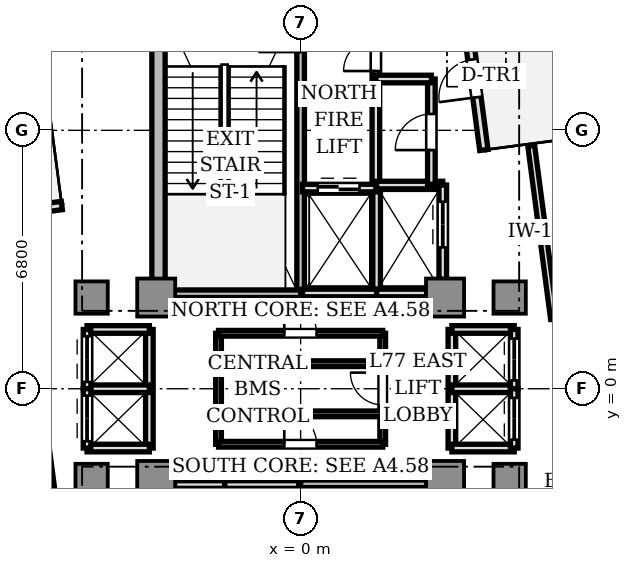
"""IFC4 building model, lengths in metres.
Left out: names, types, materials, properties, quantities, classifications, styles, units other than length and angle.
Written with IfcOpenShell. Run it as: python <this file> out.ifc"""

import sys

from ifc_helpers import new_model, si_unit, direction, frame, frame_2d, origin, origin_2d, place, context, subcontext, project, spatial, rectangle, extrude, source, transform, mapped, element, fill, save


model = new_model("IFC4")
c1 = context("Model", 3, precision=1e-05, world=origin(), true_north=direction((0.0, 1.0)))
c2 = subcontext(c1, "Body", "Model", "MODEL_VIEW")
j1 = project(units=[si_unit("LENGTHUNIT", "METRE"), si_unit("PLANEANGLEUNIT", "RADIAN")], contexts=[c1])
p1 = place(None, origin())
s1 = spatial("IfcSite", under=j1, at=p1, CompositionType="ELEMENT")
p2 = place(p1, origin())
s2 = spatial("IfcBuilding", under=s1, at=p2, CompositionType="ELEMENT")
p3 = place(p2, frame((0.0, 0.0, 275.8)))
s3 = spatial("IfcBuildingStorey", under=s2, at=p3, CompositionType="ELEMENT", Elevation=275.8)
p4 = place(p3, frame((-3.74, 2.85, 0.0), z_axis=(0.0, 0.0, 1.0), x_axis=(0.0, 1.0, 0.0)))
e1 = element("IfcWall", 1, at=p4, inside=s3, PredefinedType="SHEAR", context=c2, shape_type="SweptSolid", body=[
    extrude(rectangle(XDim=6.9, YDim=0.35, at=frame_2d((3.45, 0.0))), origin(), (0.0, 0.0, 1.0), 4.1),
])
m1 = source(origin(), c2, "Body", "SweptSolid", [
    extrude(rectangle(XDim=1.0, YDim=1.0, at=origin_2d()), origin(), (0.0, 0.0, 1.0), 4.1),
])
for number, where, z_axis, x_axis in (
    (2, (-3.8, 2.4, 0.0), (0.0, 0.0, 1.0), (1.0, 0.0, 0.0)),
    (3, (3.8, 2.4, 0.0), (0.0, 0.0, 1.0), (1.0, 0.0, 0.0)),
    (4, (-3.8, -2.4, 0.0), (0.0, 0.0, 1.0), (1.0, 0.0, 0.0)),
    (5, (3.8, -2.4, 0.0), (0.0, 0.0, 1.0), (1.0, 0.0, 0.0)),
):
    element("IfcColumn", number, at=place(p3, frame(where, z_axis=z_axis, x_axis=x_axis)), inside=s3, PredefinedType="COLUMN", context=c2, shape_type="MappedRepresentation", body=[
        mapped(m1, transform((0.0, 0.0, 0.0), scale=1.0)),
    ])
m2 = source(origin(), c2, "Body", "SweptSolid", [
    extrude(rectangle(XDim=0.85, YDim=0.85, at=origin_2d()), origin(), (0.0, 0.0, 1.0), 4.1),
])
for number, where, z_axis, x_axis in (
    (6, (5.5, 2.4, 0.0), (0.0, 0.0, 1.0), (1.0, 0.0, 0.0)),
    (7, (-5.5, 2.4, 0.0), (0.0, 0.0, 1.0), (1.0, 0.0, 0.0)),
    (8, (5.5, -2.4, 0.0), (0.0, 0.0, 1.0), (1.0, 0.0, 0.0)),
    (9, (-5.5, -2.4, 0.0), (0.0, 0.0, 1.0), (1.0, 0.0, 0.0)),
):
    element("IfcColumn", number, at=place(p3, frame(where, z_axis=z_axis, x_axis=x_axis)), inside=s3, PredefinedType="COLUMN", context=c2, shape_type="MappedRepresentation", body=[
        mapped(m2, transform((0.0, 0.0, 0.0), scale=1.0)),
    ])
p5 = place(p3, frame((4.821, 6.283, 0.0), z_axis=(0.0, 0.0, 1.0), x_axis=(-0.130475563272, 0.991451525486, 0.0)))
e10 = element("IfcWall", 10, at=p5, inside=s3, PredefinedType="STANDARD", context=c2, shape_type="SweptSolid", body=[
    extrude(rectangle(XDim=2.7, YDim=0.22, at=frame_2d((1.35, 0.0))), origin(), (0.0, 0.0, 1.0), 4.1),
])
p6 = place(p5, frame((1.4, 0.0, 0.0)))
e11 = element("IfcOpeningElement", 11, at=p6, cuts=e10, PredefinedType="OPENING", context=c2, shape_type="SweptSolid", body=[
    extrude(rectangle(XDim=1.0, YDim=2.2, at=frame_2d((0.5, 1.1))), frame((0.0, 0.12, 0.0), z_axis=(0.0, -1.0, 0.0), x_axis=(1.0, 0.0, 0.0)), (0.0, 0.0, 1.0), 0.24),
])
p7 = place(p3, frame((-6.283, 4.821, 0.0), z_axis=(0.0, 0.0, 1.0), x_axis=(-0.991451525486, -0.130475563272, 0.0)))
e12 = element("IfcWall", 12, at=p7, inside=s3, PredefinedType="STANDARD", context=c2, shape_type="SweptSolid", body=[
    extrude(rectangle(XDim=2.7, YDim=0.22, at=frame_2d((1.35, 0.0))), origin(), (0.0, 0.0, 1.0), 4.1),
])
p8 = place(p7, frame((1.4, 0.0, 0.0)))
e13 = element("IfcOpeningElement", 13, at=p8, cuts=e12, PredefinedType="OPENING", context=c2, shape_type="SweptSolid", body=[
    extrude(rectangle(XDim=1.0, YDim=2.2, at=frame_2d((0.5, 1.1))), frame((0.0, 0.12, 0.0), z_axis=(0.0, -1.0, 0.0), x_axis=(1.0, 0.0, 0.0)), (0.0, 0.0, 1.0), 0.24),
])
p9 = place(p3, frame((0.0, 2.5, 0.0), z_axis=(0.0, 0.0, 1.0), x_axis=(0.0, 1.0, 0.0)))
e14 = element("IfcWall", 14, at=p9, inside=s3, PredefinedType="SOLIDWALL", context=c2, shape_type="SweptSolid", body=[
    extrude(rectangle(XDim=7.68, YDim=0.2, at=frame_2d((3.84, 0.0))), origin(), (0.0, 0.0, 1.0), 4.1),
])
p10 = place(p9, frame((6.36, 0.0, 0.0)))
e15 = element("IfcOpeningElement", 15, at=p10, cuts=e14, PredefinedType="OPENING", context=c2, shape_type="SweptSolid", body=[
    extrude(rectangle(XDim=1.1, YDim=2.15, at=frame_2d((0.55, 1.075))), frame((0.0, 0.11, 0.0), z_axis=(0.0, -1.0, 0.0), x_axis=(1.0, 0.0, 0.0)), (0.0, 0.0, 1.0), 0.22),
])
p11 = place(p3, frame((-3.72, 2.5, 0.0), z_axis=(0.0, 0.0, 1.0), x_axis=(1.0, 0.0, 0.0)))
e16 = element("IfcWall", 16, at=p11, inside=s3, PredefinedType="SOLIDWALL", context=c2, shape_type="SweptSolid", body=[
    extrude(rectangle(XDim=3.72, YDim=0.2, at=frame_2d((1.86, 0.0))), origin(), (0.0, 0.0, 1.0), 4.1),
])
p12 = place(p3, frame((0.0, -10.18, 0.0), z_axis=(0.0, 0.0, 1.0), x_axis=(0.0, 1.0, 0.0)))
e17 = element("IfcWall", 17, at=p12, inside=s3, PredefinedType="SOLIDWALL", context=c2, shape_type="SweptSolid", body=[
    extrude(rectangle(XDim=7.68, YDim=0.2, at=frame_2d((3.84, 0.0))), origin(), (0.0, 0.0, 1.0), 4.1),
])
p13 = place(p12, frame((0.28, 0.0, 0.0)))
e18 = element("IfcOpeningElement", 18, at=p13, cuts=e17, PredefinedType="OPENING", context=c2, shape_type="SweptSolid", body=[
    extrude(rectangle(XDim=1.1, YDim=2.15, at=frame_2d((0.55, 1.075))), frame((0.0, 0.11, 0.0), z_axis=(0.0, -1.0, 0.0), x_axis=(1.0, 0.0, 0.0)), (0.0, 0.0, 1.0), 0.22),
])
p14 = place(p3, frame((0.0, -2.5, 0.0), z_axis=(0.0, 0.0, 1.0), x_axis=(1.0, 0.0, 0.0)))
e19 = element("IfcWall", 19, at=p14, inside=s3, PredefinedType="SOLIDWALL", context=c2, shape_type="SweptSolid", body=[
    extrude(rectangle(XDim=3.72, YDim=0.2, at=frame_2d((1.86, 0.0))), origin(), (0.0, 0.0, 1.0), 4.1),
])
p15 = place(p3, frame((1.98, 5.32, 0.0), z_axis=(0.0, 0.0, 1.0), x_axis=(0.0, 1.0, 0.0)))
e20 = element("IfcWall", 20, at=p15, inside=s3, PredefinedType="SOLIDWALL", context=c2, shape_type="SweptSolid", body=[
    extrude(rectangle(XDim=4.66, YDim=0.2, at=frame_2d((2.33, 0.0))), origin(), (0.0, 0.0, 1.0), 3.65),
])
p16 = place(p15, frame((3.04, 0.0, 0.0)))
e21 = element("IfcOpeningElement", 21, at=p16, cuts=e20, PredefinedType="OPENING", context=c2, shape_type="SweptSolid", body=[
    extrude(rectangle(XDim=0.85, YDim=2.1, at=frame_2d((0.425, 1.05))), frame((0.0, 0.11, 0.0), z_axis=(0.0, -1.0, 0.0), x_axis=(1.0, 0.0, 0.0)), (0.0, 0.0, 1.0), 0.22),
])
p17 = place(p3, frame((2.0, 2.5, 0.0), z_axis=(0.0, 0.0, 1.0), x_axis=(0.0, 1.0, 0.0)))
e22 = element("IfcWall", 22, at=p17, inside=s3, PredefinedType="SOLIDWALL", context=c2, shape_type="SweptSolid", body=[
    extrude(rectangle(XDim=2.78, YDim=0.2, at=frame_2d((1.39, 0.0))), origin(), (0.0, 0.0, 1.0), 3.65),
])
p18 = place(p3, frame((0.05, 2.52, 0.0), z_axis=(0.0, 0.0, 1.0), x_axis=(1.0, 0.0, 0.0)))
e23 = element("IfcWall", 23, at=p18, inside=s3, PredefinedType="SOLIDWALL", context=c2, shape_type="SweptSolid", body=[
    extrude(rectangle(XDim=1.95, YDim=0.2, at=frame_2d((0.975, 0.0))), origin(), (0.0, 0.0, 1.0), 3.65),
])
p19 = place(p3, frame((0.05, 5.28, 0.0), z_axis=(0.0, 0.0, 1.0), x_axis=(1.0, 0.0, 0.0)))
e24 = element("IfcWall", 24, at=p19, inside=s3, PredefinedType="SOLIDWALL", context=c2, shape_type="SweptSolid", body=[
    extrude(rectangle(XDim=1.93, YDim=0.2, at=frame_2d((0.965, 0.0))), origin(), (0.0, 0.0, 1.0), 3.65),
])
p20 = place(p19, frame((0.4, 0.0, 0.0)))
e25 = element("IfcOpeningElement", 25, at=p20, cuts=e24, PredefinedType="OPENING", context=c2, shape_type="SweptSolid", body=[
    extrude(rectangle(XDim=1.1, YDim=2.2, at=frame_2d((0.55, 1.1))), frame((0.0, 0.11, 0.0), z_axis=(0.0, -1.0, 0.0), x_axis=(1.0, 0.0, 0.0)), (0.0, 0.0, 1.0), 0.22),
])
p21 = place(p3, frame((-2.0, -5.28, 0.0), z_axis=(0.0, 0.0, 1.0), x_axis=(0.0, 1.0, 0.0)))
e26 = element("IfcWall", 26, at=p21, inside=s3, PredefinedType="SOLIDWALL", context=c2, shape_type="SweptSolid", body=[
    extrude(rectangle(XDim=2.78, YDim=0.2, at=frame_2d((1.39, 0.0))), origin(), (0.0, 0.0, 1.0), 3.65),
])
p22 = place(p3, frame((-2.0, -2.52, 0.0), z_axis=(0.0, 0.0, 1.0), x_axis=(1.0, 0.0, 0.0)))
e27 = element("IfcWall", 27, at=p22, inside=s3, PredefinedType="SOLIDWALL", context=c2, shape_type="SweptSolid", body=[
    extrude(rectangle(XDim=1.95, YDim=0.2, at=frame_2d((0.975, 0.0))), origin(), (0.0, 0.0, 1.0), 3.65),
])
p23 = place(p3, frame((2.0, 2.52, 0.0), z_axis=(0.0, 0.0, 1.0), x_axis=(1.0, 0.0, 0.0)))
e28 = element("IfcWall", 28, at=p23, inside=s3, PredefinedType="SOLIDWALL", context=c2, shape_type="SweptSolid", body=[
    extrude(rectangle(XDim=1.32, YDim=0.2, at=frame_2d((0.66, 0.0))), origin(), (0.0, 0.0, 1.0), 3.65),
])
p24 = place(p3, frame((2.0, 5.36, 0.0), z_axis=(0.0, 0.0, 1.0), x_axis=(1.0, 0.0, 0.0)))
e29 = element("IfcWall", 29, at=p24, inside=s3, PredefinedType="SOLIDWALL", context=c2, shape_type="SweptSolid", body=[
    extrude(rectangle(XDim=1.74, YDim=0.2, at=frame_2d((0.87, 0.0))), origin(), (0.0, 0.0, 1.0), 3.65),
])
p25 = place(p3, frame((3.74, 2.88, 0.0), z_axis=(0.0, 0.0, 1.0), x_axis=(0.0, 1.0, 0.0)))
e30 = element("IfcWall", 30, at=p25, inside=s3, PredefinedType="SOLIDWALL", context=c2, shape_type="SweptSolid", body=[
    extrude(rectangle(XDim=2.48, YDim=0.2, at=frame_2d((1.24, 0.0))), origin(), (0.0, 0.0, 1.0), 3.65),
])
p26 = place(p25, frame((0.84, 0.0, 0.0)))
e31 = element("IfcOpeningElement", 31, at=p26, cuts=e30, PredefinedType="OPENING", context=c2, shape_type="SweptSolid", body=[
    extrude(rectangle(XDim=1.2, YDim=2.2, at=frame_2d((0.6, 1.1))), frame((0.0, 0.11, 0.0), z_axis=(0.0, -1.0, 0.0), x_axis=(1.0, 0.0, 0.0)), (0.0, 0.0, 1.0), 0.22),
])
p27 = place(p3, frame((-3.32, -2.52, 0.0), z_axis=(0.0, 0.0, 1.0), x_axis=(1.0, 0.0, 0.0)))
e32 = element("IfcWall", 32, at=p27, inside=s3, PredefinedType="SOLIDWALL", context=c2, shape_type="SweptSolid", body=[
    extrude(rectangle(XDim=1.32, YDim=0.2, at=frame_2d((0.66, 0.0))), origin(), (0.0, 0.0, 1.0), 3.65),
])
p28 = place(p3, frame((3.98, -1.56, 0.0), z_axis=(0.0, 0.0, 1.0), x_axis=(0.0, 1.0, 0.0)))
e33 = element("IfcWall", 33, at=p28, inside=s3, PredefinedType="SOLIDWALL", context=c2, shape_type="SweptSolid", body=[
    extrude(rectangle(XDim=3.12, YDim=0.2, at=frame_2d((1.56, 0.0))), origin(), (0.0, 0.0, 1.0), 3.32),
])
for number, where, z_axis, x_axis in (
    (34, (3.98, 1.56, 0.0), (0.0, 0.0, 1.0), (1.0, 0.0, 0.0)),
    (35, (3.98, -1.56, 0.0), (0.0, 0.0, 1.0), (1.0, 0.0, 0.0)),
    (36, (3.98, 0.0, 0.0), (0.0, 0.0, 1.0), (1.0, 0.0, 0.0)),
):
    element("IfcWall", number, at=place(p3, frame(where, z_axis=z_axis, x_axis=x_axis)), inside=s3, PredefinedType="SOLIDWALL", context=c2, shape_type="SweptSolid", body=[
        extrude(rectangle(XDim=1.64, YDim=0.2, at=frame_2d((0.82, 0.0))), origin(), (0.0, 0.0, 1.0), 3.65),
    ])
p29 = place(p3, frame((5.62, 0.0, 0.0), z_axis=(0.0, 0.0, 1.0), x_axis=(0.0, 1.0, 0.0)))
e37 = element("IfcWall", 37, at=p29, inside=s3, PredefinedType="SOLIDWALL", context=c2, shape_type="SweptSolid", body=[
    extrude(rectangle(XDim=1.56, YDim=0.2, at=frame_2d((0.78, 0.0))), origin(), (0.0, 0.0, 1.0), 3.65),
])
p30 = place(p29, frame((0.22, 0.0, 0.0)))
e38 = element("IfcOpeningElement", 38, at=p30, cuts=e37, PredefinedType="OPENING", context=c2, shape_type="SweptSolid", body=[
    extrude(rectangle(XDim=1.1, YDim=2.2, at=frame_2d((0.55, 1.1))), frame((0.0, 0.11, 0.0), z_axis=(0.0, -1.0, 0.0), x_axis=(1.0, 0.0, 0.0)), (0.0, 0.0, 1.0), 0.22),
])
p31 = place(p3, frame((5.62, -1.56, 0.0), z_axis=(0.0, 0.0, 1.0), x_axis=(0.0, 1.0, 0.0)))
e39 = element("IfcWall", 39, at=p31, inside=s3, PredefinedType="SOLIDWALL", context=c2, shape_type="SweptSolid", body=[
    extrude(rectangle(XDim=1.56, YDim=0.2, at=frame_2d((0.78, 0.0))), origin(), (0.0, 0.0, 1.0), 3.65),
])
p32 = place(p31, frame((0.22, 0.0, 0.0)))
e40 = element("IfcOpeningElement", 40, at=p32, cuts=e39, PredefinedType="OPENING", context=c2, shape_type="SweptSolid", body=[
    extrude(rectangle(XDim=1.1, YDim=2.2, at=frame_2d((0.55, 1.1))), frame((0.0, 0.11, 0.0), z_axis=(0.0, -1.0, 0.0), x_axis=(1.0, 0.0, 0.0)), (0.0, 0.0, 1.0), 0.22),
])
p33 = place(p3, frame((-3.98, -1.56, 0.0), z_axis=(0.0, 0.0, 1.0), x_axis=(0.0, 1.0, 0.0)))
e41 = element("IfcWall", 41, at=p33, inside=s3, PredefinedType="SOLIDWALL", context=c2, shape_type="SweptSolid", body=[
    extrude(rectangle(XDim=3.12, YDim=0.2, at=frame_2d((1.56, 0.0))), origin(), (0.0, 0.0, 1.0), 3.32),
])
for number, where, z_axis, x_axis in (
    (42, (-5.62, 1.56, 0.0), (0.0, 0.0, 1.0), (1.0, 0.0, 0.0)),
    (43, (-5.62, -1.56, 0.0), (0.0, 0.0, 1.0), (1.0, 0.0, 0.0)),
    (44, (-5.62, 0.0, 0.0), (0.0, 0.0, 1.0), (1.0, 0.0, 0.0)),
):
    element("IfcWall", number, at=place(p3, frame(where, z_axis=z_axis, x_axis=x_axis)), inside=s3, PredefinedType="SOLIDWALL", context=c2, shape_type="SweptSolid", body=[
        extrude(rectangle(XDim=1.64, YDim=0.2, at=frame_2d((0.82, 0.0))), origin(), (0.0, 0.0, 1.0), 3.65),
    ])
p34 = place(p3, frame((-5.62, 0.0, 0.0), z_axis=(0.0, 0.0, 1.0), x_axis=(0.0, 1.0, 0.0)))
e45 = element("IfcWall", 45, at=p34, inside=s3, PredefinedType="SOLIDWALL", context=c2, shape_type="SweptSolid", body=[
    extrude(rectangle(XDim=1.56, YDim=0.2, at=frame_2d((0.78, 0.0))), origin(), (0.0, 0.0, 1.0), 3.65),
])
p35 = place(p34, frame((0.18, 0.0, 0.0)))
e46 = element("IfcOpeningElement", 46, at=p35, cuts=e45, PredefinedType="OPENING", context=c2, shape_type="SweptSolid", body=[
    extrude(rectangle(XDim=1.2, YDim=2.2, at=frame_2d((0.6, 1.1))), frame((0.0, 0.11, 0.0), z_axis=(0.0, -1.0, 0.0), x_axis=(1.0, 0.0, 0.0)), (0.0, 0.0, 1.0), 0.22),
])
p36 = place(p3, frame((-5.62, -1.56, 0.0), z_axis=(0.0, 0.0, 1.0), x_axis=(0.0, 1.0, 0.0)))
e47 = element("IfcWall", 47, at=p36, inside=s3, PredefinedType="SOLIDWALL", context=c2, shape_type="SweptSolid", body=[
    extrude(rectangle(XDim=1.56, YDim=0.2, at=frame_2d((0.78, 0.0))), origin(), (0.0, 0.0, 1.0), 3.65),
])
p37 = place(p36, frame((0.18, 0.0, 0.0)))
e48 = element("IfcOpeningElement", 48, at=p37, cuts=e47, PredefinedType="OPENING", context=c2, shape_type="SweptSolid", body=[
    extrude(rectangle(XDim=1.2, YDim=2.2, at=frame_2d((0.6, 1.1))), frame((0.0, 0.11, 0.0), z_axis=(0.0, -1.0, 0.0), x_axis=(1.0, 0.0, 0.0)), (0.0, 0.0, 1.0), 0.22),
])
p38 = place(p3, frame((3.44, 5.38, 0.0), z_axis=(0.0, 0.0, 1.0), x_axis=(0.0, 1.0, 0.0)))
e49 = element("IfcWall", 49, at=p38, inside=s3, PredefinedType="SOLIDWALL", context=c2, shape_type="SweptSolid", body=[
    extrude(rectangle(XDim=2.77, YDim=0.2, at=frame_2d((1.385, 0.0))), origin(), (0.0, 0.0, 1.0), 3.65),
])
p39 = place(p38, frame((0.9, 0.0, 0.0)))
e50 = element("IfcOpeningElement", 50, at=p39, cuts=e49, PredefinedType="OPENING", context=c2, shape_type="SweptSolid", body=[
    extrude(rectangle(XDim=0.95, YDim=2.15, at=frame_2d((0.475, 1.075))), frame((0.0, 0.11, 0.0), z_axis=(0.0, -1.0, 0.0), x_axis=(1.0, 0.0, 0.0)), (0.0, 0.0, 1.0), 0.22),
])
p40 = place(p3, frame((1.98, 8.15, 0.0), z_axis=(0.0, 0.0, 1.0), x_axis=(1.0, 0.0, 0.0)))
e51 = element("IfcWall", 51, at=p40, inside=s3, PredefinedType="SOLIDWALL", context=c2, shape_type="SweptSolid", body=[
    extrude(rectangle(XDim=1.46, YDim=0.2, at=frame_2d((0.73, 0.0))), origin(), (0.0, 0.0, 1.0), 3.65),
])
p41 = place(p3, frame((2.16, -1.46, 0.0), z_axis=(0.0, 0.0, 1.0), x_axis=(0.0, 1.0, 0.0)))
e52 = element("IfcWall", 52, at=p41, inside=s3, PredefinedType="PARTITIONING", context=c2, shape_type="SweptSolid", body=[
    extrude(rectangle(XDim=2.92, YDim=0.15, at=frame_2d((1.46, 0.0))), origin(), (0.0, 0.0, 1.0), 3.65),
])
p42 = place(p41, frame((1.035, 0.0, 0.0)))
e53 = element("IfcOpeningElement", 53, at=p42, cuts=e52, PredefinedType="OPENING", context=c2, shape_type="SweptSolid", body=[
    extrude(rectangle(XDim=0.85, YDim=2.1, at=frame_2d((0.425, 1.05))), frame((0.0, 0.085, 0.0), z_axis=(0.0, -1.0, 0.0), x_axis=(1.0, 0.0, 0.0)), (0.0, 0.0, 1.0), 0.17),
])
p43 = place(p3, frame((-2.16, -1.46, 0.0), z_axis=(0.0, 0.0, 1.0), x_axis=(0.0, 1.0, 0.0)))
e54 = element("IfcWall", 54, at=p43, inside=s3, PredefinedType="PARTITIONING", context=c2, shape_type="SweptSolid", body=[
    extrude(rectangle(XDim=2.92, YDim=0.15, at=frame_2d((1.46, 0.0))), origin(), (0.0, 0.0, 1.0), 3.65),
])
p44 = place(p3, frame((-2.16, 1.46, 0.0), z_axis=(0.0, 0.0, 1.0), x_axis=(1.0, 0.0, 0.0)))
e55 = element("IfcWall", 55, at=p44, inside=s3, PredefinedType="PARTITIONING", context=c2, shape_type="SweptSolid", body=[
    extrude(rectangle(XDim=4.32, YDim=0.15, at=frame_2d((2.16, 0.0))), origin(), (0.0, 0.0, 1.0), 3.65),
])
p45 = place(p44, frame((1.73, 0.0, 0.0)))
e56 = element("IfcOpeningElement", 56, at=p45, cuts=e55, PredefinedType="OPENING", context=c2, shape_type="SweptSolid", body=[
    extrude(rectangle(XDim=0.85, YDim=2.1, at=frame_2d((0.425, 1.05))), frame((0.0, 0.085, 0.0), z_axis=(0.0, -1.0, 0.0), x_axis=(1.0, 0.0, 0.0)), (0.0, 0.0, 1.0), 0.17),
])
p46 = place(p3, frame((-2.16, -1.46, 0.0), z_axis=(0.0, 0.0, 1.0), x_axis=(1.0, 0.0, 0.0)))
e57 = element("IfcWall", 57, at=p46, inside=s3, PredefinedType="PARTITIONING", context=c2, shape_type="SweptSolid", body=[
    extrude(rectangle(XDim=4.32, YDim=0.15, at=frame_2d((2.16, 0.0))), origin(), (0.0, 0.0, 1.0), 3.65),
])
p47 = place(p46, frame((1.73, 0.0, 0.0)))
e58 = element("IfcOpeningElement", 58, at=p47, cuts=e57, PredefinedType="OPENING", context=c2, shape_type="SweptSolid", body=[
    extrude(rectangle(XDim=0.85, YDim=2.1, at=frame_2d((0.425, 1.05))), frame((0.0, 0.085, 0.0), z_axis=(0.0, -1.0, 0.0), x_axis=(1.0, 0.0, 0.0)), (0.0, 0.0, 1.0), 0.17),
])
for number, where, z_axis, x_axis in (
    (59, (-2.16, 0.66, 0.0), (0.0, 0.0, 1.0), (1.0, 0.0, 0.0)),
    (60, (-2.16, -0.66, 0.0), (0.0, 0.0, 1.0), (1.0, 0.0, 0.0)),
):
    element("IfcWall", number, at=place(p3, frame(where, z_axis=z_axis, x_axis=x_axis)), inside=s3, PredefinedType="PARTITIONING", context=c2, shape_type="SweptSolid", body=[
        extrude(rectangle(XDim=4.32, YDim=0.15, at=frame_2d((2.16, 0.0))), origin(), (0.0, 0.0, 1.0), 3.65),
    ])
p48 = place(p3, frame((6.667, 1.836, 0.0), z_axis=(0.0, 0.0, 1.0), x_axis=(-0.130564346904, 0.991439837467, 0.0)))
e61 = element("IfcWall", 61, at=p48, inside=s3, PredefinedType="PARTITIONING", context=c2, shape_type="SweptSolid", body=[
    extrude(rectangle(XDim=4.6, YDim=0.18, at=frame_2d((2.3, 0.0))), origin(), (0.0, 0.0, 1.0), 3.65),
])
p49 = place(p3, frame((-7.229, 2.427, 0.0), z_axis=(0.0, 0.0, 1.0), x_axis=(0.130548179903, -0.991441966392, 0.0)))
e62 = element("IfcWall", 62, at=p49, inside=s3, PredefinedType="PARTITIONING", context=c2, shape_type="SweptSolid", body=[
    extrude(rectangle(XDim=8.9, YDim=0.18, at=frame_2d((4.45, 0.0))), origin(), (0.0, 0.0, 1.0), 3.65),
])
m3 = source(origin(), c2, "Body", "SweptSolid", [
    extrude(rectangle(XDim=1.0, YDim=0.05, at=origin_2d()), origin(), (0.0, 0.0, 1.0), 2.2),
])
p50 = place(p6, frame((0.5, 0.0, 0.0)))
e63 = element("IfcDoor", 63, at=p50, inside=s3, OperationType="SINGLE_SWING_LEFT", PredefinedType="DOOR", context=c2, shape_type="MappedRepresentation", body=[
    mapped(m3, transform((0.0, 0.0, 0.0), scale=1.0)),
])
fill(e11, e63)
m4 = source(origin(), c2, "Body", "SweptSolid", [
    extrude(rectangle(XDim=0.85, YDim=0.05, at=origin_2d()), origin(), (0.0, 0.0, 1.0), 2.1),
])
p51 = place(p16, frame((0.425, 0.0, 0.0)))
e64 = element("IfcDoor", 64, at=p51, inside=s3, OperationType="SINGLE_SWING_LEFT", PredefinedType="DOOR", context=c2, shape_type="MappedRepresentation", body=[
    mapped(m4, transform((0.0, 0.0, 0.0), scale=1.0)),
])
fill(e21, e64)
m5 = source(origin(), c2, "Body", "SweptSolid", [
    extrude(rectangle(XDim=1.1, YDim=0.05, at=origin_2d()), origin(), (0.0, 0.0, 1.0), 2.2),
])
p52 = place(p20, frame((0.55, 0.0, 0.0)))
e65 = element("IfcDoor", 65, at=p52, inside=s3, OperationType="DOUBLE_DOOR_SLIDING", PredefinedType="DOOR", context=c2, shape_type="MappedRepresentation", body=[
    mapped(m5, transform((0.0, 0.0, 0.0), scale=1.0)),
])
fill(e25, e65)
m6 = source(origin(), c2, "Body", "SweptSolid", [
    extrude(rectangle(XDim=1.2, YDim=0.05, at=origin_2d()), origin(), (0.0, 0.0, 1.0), 2.2),
])
p53 = place(p26, frame((0.6, 0.0, 0.0)))
e66 = element("IfcDoor", 66, at=p53, inside=s3, OperationType="DOUBLE_DOOR_SLIDING", PredefinedType="DOOR", context=c2, shape_type="MappedRepresentation", body=[
    mapped(m6, transform((0.0, 0.0, 0.0), scale=1.0)),
])
fill(e31, e66)
p54 = place(p30, frame((0.55, 0.0, 0.0)))
e67 = element("IfcDoor", 67, at=p54, inside=s3, OperationType="DOUBLE_DOOR_SLIDING", PredefinedType="DOOR", context=c2, shape_type="MappedRepresentation", body=[
    mapped(m5, transform((0.0, 0.0, 0.0), scale=1.0)),
])
fill(e38, e67)
p55 = place(p32, frame((0.55, 0.0, 0.0)))
e68 = element("IfcDoor", 68, at=p55, inside=s3, OperationType="DOUBLE_DOOR_SLIDING", PredefinedType="DOOR", context=c2, shape_type="MappedRepresentation", body=[
    mapped(m5, transform((0.0, 0.0, 0.0), scale=1.0)),
])
fill(e40, e68)
p56 = place(p35, frame((0.6, 0.0, 0.0)))
e69 = element("IfcDoor", 69, at=p56, inside=s3, OperationType="DOUBLE_DOOR_SLIDING", PredefinedType="DOOR", context=c2, shape_type="MappedRepresentation", body=[
    mapped(m6, transform((0.0, 0.0, 0.0), scale=1.0)),
])
fill(e46, e69)
p57 = place(p37, frame((0.6, 0.0, 0.0)))
e70 = element("IfcDoor", 70, at=p57, inside=s3, OperationType="DOUBLE_DOOR_SLIDING", PredefinedType="DOOR", context=c2, shape_type="MappedRepresentation", body=[
    mapped(m6, transform((0.0, 0.0, 0.0), scale=1.0)),
])
fill(e48, e70)
m7 = source(origin(), c2, "Body", "SweptSolid", [
    extrude(rectangle(XDim=0.95, YDim=0.05, at=origin_2d()), origin(), (0.0, 0.0, 1.0), 2.15),
])
p58 = place(p39, frame((0.475, 0.0, 0.0)))
e71 = element("IfcDoor", 71, at=p58, inside=s3, OperationType="SINGLE_SWING_LEFT", PredefinedType="DOOR", context=c2, shape_type="MappedRepresentation", body=[
    mapped(m7, transform((0.0, 0.0, 0.0), scale=1.0)),
])
fill(e50, e71)
p59 = place(p45, frame((0.425, 0.0, 0.0)))
e72 = element("IfcDoor", 72, at=p59, inside=s3, OperationType="SINGLE_SWING_LEFT", PredefinedType="DOOR", context=c2, shape_type="MappedRepresentation", body=[
    mapped(m4, transform((0.0, 0.0, 0.0), scale=1.0)),
])
fill(e56, e72)
p60 = place(p42, frame((0.425, 0.0, 0.0)))
e73 = element("IfcDoor", 73, at=p60, inside=s3, OperationType="SINGLE_SWING_RIGHT", PredefinedType="DOOR", context=c2, shape_type="MappedRepresentation", body=[
    mapped(m4, transform((0.0, 0.0, 0.0), scale=1.0)),
])
fill(e53, e73)
p61 = place(p47, frame((0.425, 0.0, 0.0)))
e74 = element("IfcDoor", 74, at=p61, inside=s3, OperationType="SINGLE_SWING_LEFT", PredefinedType="DOOR", context=c2, shape_type="MappedRepresentation", body=[
    mapped(m4, transform((0.0, 0.0, 0.0), scale=1.0)),
])
fill(e58, e74)
save(model, sys.argv[1])
